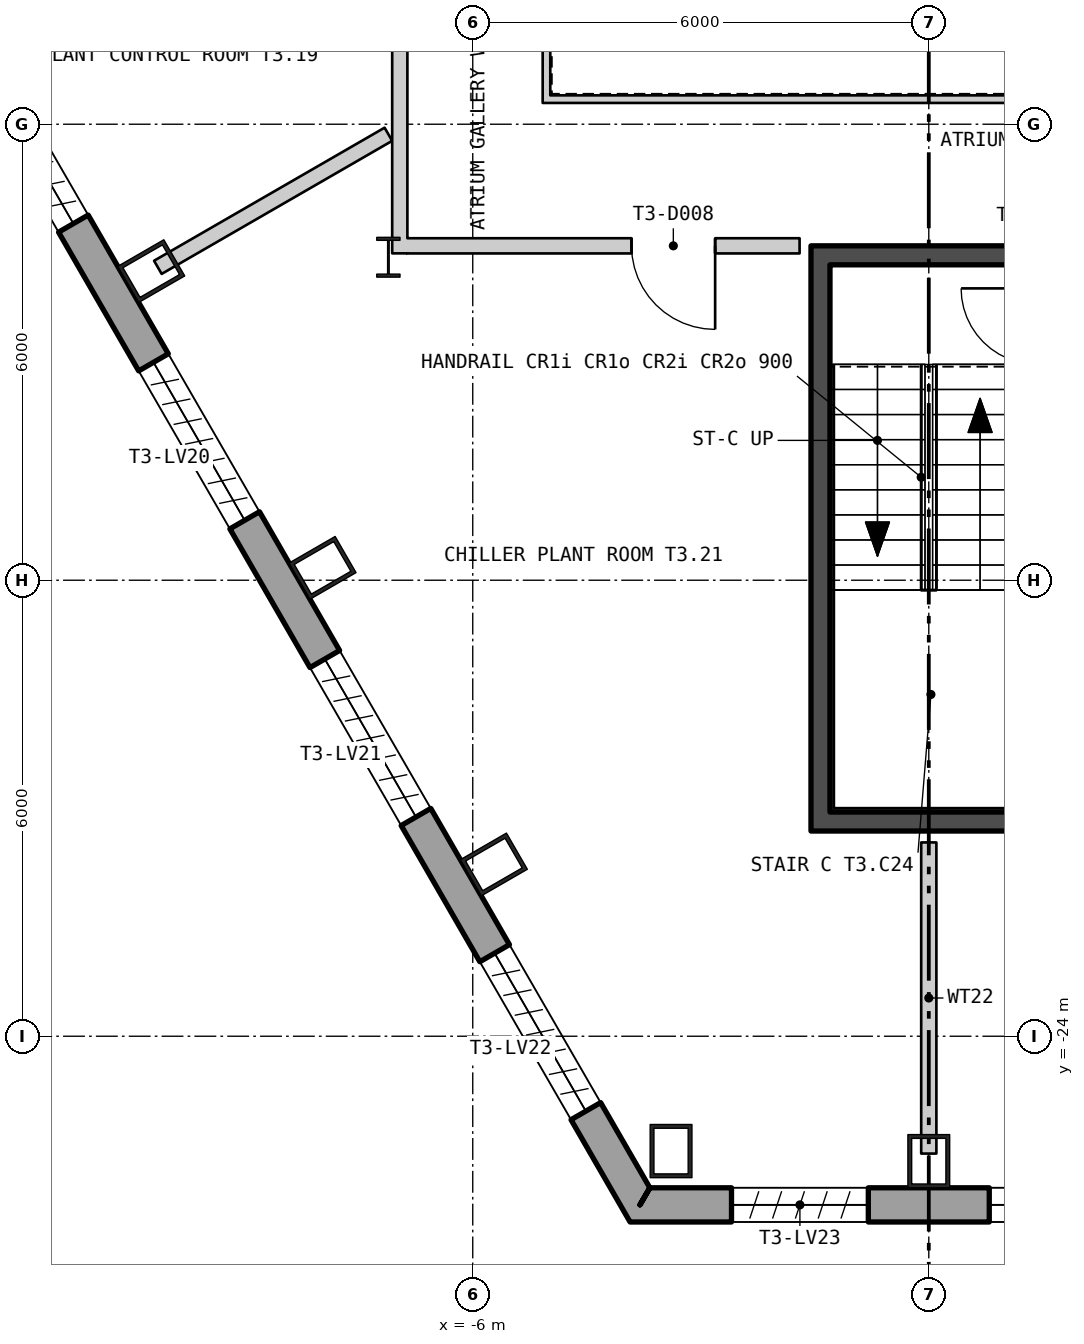
"""IFC4 building model, lengths in metres.
Left out: names, types, materials, properties, quantities, classifications, styles, units other than length and angle.
Written with IfcOpenShell. Run it as: python <this file> out.ifc"""

import sys

from ifc_helpers import new_model, si_unit, direction, frame, frame_2d, origin, origin_2d, place, context, subcontext, project, spatial, polyline, rectangle, hollow_rectangle, i_section, outline, extrude, element, fill, save


model = new_model("IFC4")
c1 = context("Model", 3, precision=1e-05, world=origin(), true_north=direction((0.0, 1.0)))
c2 = subcontext(c1, "Body", "Model", "MODEL_VIEW")
j1 = project(units=[si_unit("LENGTHUNIT", "METRE"), si_unit("PLANEANGLEUNIT", "RADIAN")], contexts=[c1])
p1 = place(None, origin())
s1 = spatial("IfcSite", under=j1, at=p1, CompositionType="ELEMENT")
p2 = place(p1, origin())
s2 = spatial("IfcBuilding", under=s1, at=p2, CompositionType="ELEMENT")
p3 = place(p2, frame((0.0, 0.0, 186.6)))
s3 = spatial("IfcBuildingStorey", under=s2, at=p3, CompositionType="ELEMENT", Elevation=186.6)
for number, where, z_axis, x_axis in (
    (1, (-10.23, -13.933, 0.0), (0.0, 0.0, 1.0), (0.5, -0.866, 0.0)),
    (2, (-7.976, -17.837, 0.0), (0.0, 0.0, 1.0), (0.5, -0.866, 0.0)),
    (3, (-5.722, -21.74, 0.0), (0.0, 0.0, 1.0), (0.5, -0.866, 0.0)),
    (4, (-3.391, -25.511, 0.0), (0.0, 0.0, 1.0), (1.0, 0.0, 0.0)),
    (5, (0.0, -25.644, 0.0), (0.0, 0.0, 1.0), (1.0, 0.0, 0.0)),
):
    element("IfcColumn", number, at=place(p3, frame(where, z_axis=z_axis, x_axis=x_axis)), inside=s3, PredefinedType="COLUMN", context=c2, shape_type="SweptSolid", body=[
        extrude(hollow_rectangle(XDim=0.55, YDim=0.7, WallThickness=0.05, at=origin_2d()), origin(), (0.0, 0.0, 1.0), 6.0),
    ])
p4 = place(p3, frame((-7.11, -13.75, 0.0), z_axis=(0.0, 0.0, 1.0), x_axis=(1.0, 0.0, 0.0)))
e6 = element("IfcColumn", 6, at=p4, inside=s3, PredefinedType="COLUMN", context=c2, shape_type="SweptSolid", body=[
    extrude(i_section(OverallWidth=0.306, OverallDepth=0.524, WebThickness=0.021, FlangeThickness=0.04, at=origin_2d()), origin(), (0.0, 0.0, 1.0), 6.0),
])
p5 = place(p3, frame((-26.67, 13.393, -0.18), z_axis=(0.0, 0.0, 1.0), x_axis=(0.500000711659, -0.866024992908, 0.0)))
e7 = element("IfcWall", 7, at=p5, inside=s3, PredefinedType="SOLIDWALL", context=c2, shape_type="SweptSolid", body=[
    extrude(outline(polyline([(-0.13, -0.225), (45.87, -0.225), (45.61, 0.225), (0.13, 0.225), (-0.13, -0.225)])), origin(), (0.0, 0.0, 1.0), 6.0),
])
p6 = place(p5, frame((1.424, 0.0, 1.38)))
e8 = element("IfcOpeningElement", 8, at=p6, cuts=e7, PredefinedType="OPENING", context=c2, shape_type="SweptSolid", body=[
    extrude(rectangle(XDim=2.4, YDim=3.6, at=frame_2d((1.2, 1.8))), frame((0.0, 0.235, 0.0), z_axis=(0.0, -1.0, 0.0), x_axis=(1.0, 0.0, 0.0)), (0.0, 0.0, 1.0), 0.47),
])
p7 = place(p5, frame((5.893, 0.0, 1.38)))
e9 = element("IfcOpeningElement", 9, at=p7, cuts=e7, PredefinedType="OPENING", context=c2, shape_type="SweptSolid", body=[
    extrude(rectangle(XDim=2.4, YDim=3.6, at=frame_2d((1.2, 1.8))), frame((0.0, 0.235, 0.0), z_axis=(0.0, -1.0, 0.0), x_axis=(1.0, 0.0, 0.0)), (0.0, 0.0, 1.0), 0.47),
])
p8 = place(p5, frame((10.401, 0.0, 1.38)))
e10 = element("IfcOpeningElement", 10, at=p8, cuts=e7, PredefinedType="OPENING", context=c2, shape_type="SweptSolid", body=[
    extrude(rectangle(XDim=2.4, YDim=3.6, at=frame_2d((1.2, 1.8))), frame((0.0, 0.235, 0.0), z_axis=(0.0, -1.0, 0.0), x_axis=(1.0, 0.0, 0.0)), (0.0, 0.0, 1.0), 0.47),
])
p9 = place(p5, frame((14.909, 0.0, 1.38)))
e11 = element("IfcOpeningElement", 11, at=p9, cuts=e7, PredefinedType="OPENING", context=c2, shape_type="SweptSolid", body=[
    extrude(rectangle(XDim=2.4, YDim=3.6, at=frame_2d((1.2, 1.8))), frame((0.0, 0.235, 0.0), z_axis=(0.0, -1.0, 0.0), x_axis=(1.0, 0.0, 0.0)), (0.0, 0.0, 1.0), 0.47),
])
p10 = place(p5, frame((19.416, 0.0, 1.38)))
e12 = element("IfcOpeningElement", 12, at=p10, cuts=e7, PredefinedType="OPENING", context=c2, shape_type="SweptSolid", body=[
    extrude(rectangle(XDim=2.4, YDim=3.6, at=frame_2d((1.2, 1.8))), frame((0.0, 0.235, 0.0), z_axis=(0.0, -1.0, 0.0), x_axis=(1.0, 0.0, 0.0)), (0.0, 0.0, 1.0), 0.47),
])
p11 = place(p5, frame((23.924, 0.0, 1.38)))
e13 = element("IfcOpeningElement", 13, at=p11, cuts=e7, PredefinedType="OPENING", context=c2, shape_type="SweptSolid", body=[
    extrude(rectangle(XDim=2.4, YDim=3.6, at=frame_2d((1.2, 1.8))), frame((0.0, 0.235, 0.0), z_axis=(0.0, -1.0, 0.0), x_axis=(1.0, 0.0, 0.0)), (0.0, 0.0, 1.0), 0.47),
])
p12 = place(p5, frame((28.431, 0.0, 1.38)))
e14 = element("IfcOpeningElement", 14, at=p12, cuts=e7, PredefinedType="OPENING", context=c2, shape_type="SweptSolid", body=[
    extrude(rectangle(XDim=2.4, YDim=3.6, at=frame_2d((1.2, 1.8))), frame((0.0, 0.235, 0.0), z_axis=(0.0, -1.0, 0.0), x_axis=(1.0, 0.0, 0.0)), (0.0, 0.0, 1.0), 0.47),
])
p13 = place(p5, frame((32.939, 0.0, 1.38)))
e15 = element("IfcOpeningElement", 15, at=p13, cuts=e7, PredefinedType="OPENING", context=c2, shape_type="SweptSolid", body=[
    extrude(rectangle(XDim=2.4, YDim=3.6, at=frame_2d((1.2, 1.8))), frame((0.0, 0.235, 0.0), z_axis=(0.0, -1.0, 0.0), x_axis=(1.0, 0.0, 0.0)), (0.0, 0.0, 1.0), 0.47),
])
p14 = place(p5, frame((37.447, 0.0, 1.38)))
e16 = element("IfcOpeningElement", 16, at=p14, cuts=e7, PredefinedType="OPENING", context=c2, shape_type="SweptSolid", body=[
    extrude(rectangle(XDim=2.4, YDim=3.6, at=frame_2d((1.2, 1.8))), frame((0.0, 0.235, 0.0), z_axis=(0.0, -1.0, 0.0), x_axis=(1.0, 0.0, 0.0)), (0.0, 0.0, 1.0), 0.47),
])
p15 = place(p5, frame((41.916, 0.0, 1.38)))
e17 = element("IfcOpeningElement", 17, at=p15, cuts=e7, PredefinedType="OPENING", context=c2, shape_type="SweptSolid", body=[
    extrude(rectangle(XDim=2.4, YDim=3.6, at=frame_2d((1.2, 1.8))), frame((0.0, 0.235, 0.0), z_axis=(0.0, -1.0, 0.0), x_axis=(1.0, 0.0, 0.0)), (0.0, 0.0, 1.0), 0.47),
])
p16 = place(p3, frame((-3.8, -26.219, -0.18), z_axis=(0.0, 0.0, 1.0), x_axis=(1.0, 0.0, 0.0)))
e18 = element("IfcWall", 18, at=p16, inside=s3, PredefinedType="SOLIDWALL", context=c2, shape_type="SweptSolid", body=[
    extrude(outline(polyline([(-0.13, -0.225), (7.73, -0.225), (7.47, 0.225), (0.13, 0.225), (-0.13, -0.225)])), origin(), (0.0, 0.0, 1.0), 6.0),
])
p17 = place(p16, frame((1.204, 0.0, 1.38)))
e19 = element("IfcOpeningElement", 19, at=p17, cuts=e18, PredefinedType="OPENING", context=c2, shape_type="SweptSolid", body=[
    extrude(rectangle(XDim=1.8, YDim=3.6, at=frame_2d((0.9, 1.8))), frame((0.0, 0.235, 0.0), z_axis=(0.0, -1.0, 0.0), x_axis=(1.0, 0.0, 0.0)), (0.0, 0.0, 1.0), 0.47),
])
p18 = place(p16, frame((4.596, 0.0, 1.38)))
e20 = element("IfcOpeningElement", 20, at=p18, cuts=e18, PredefinedType="OPENING", context=c2, shape_type="SweptSolid", body=[
    extrude(rectangle(XDim=1.8, YDim=3.6, at=frame_2d((0.9, 1.8))), frame((0.0, 0.235, 0.0), z_axis=(0.0, -1.0, 0.0), x_axis=(1.0, 0.0, 0.0)), (0.0, 0.0, 1.0), 0.47),
])
p19 = place(p3, frame((-5.08, -11.67, 0.0), z_axis=(0.0, 0.0, 1.0), x_axis=(1.0, 0.0, 0.0)))
e21 = element("IfcWall", 21, at=p19, inside=s3, PredefinedType="PARTITIONING", context=c2, shape_type="SweptSolid", body=[
    extrude(rectangle(XDim=10.16, YDim=0.1, at=frame_2d((5.08, 0.0))), origin(), (0.0, 0.0, 1.0), 5.8),
])
p20 = place(p3, frame((-5.03, -3.58, 0.0), z_axis=(0.0, 0.0, 1.0), x_axis=(0.0, -1.0, 0.0)))
e22 = element("IfcWall", 22, at=p20, inside=s3, PredefinedType="PARTITIONING", context=c2, shape_type="SweptSolid", body=[
    extrude(rectangle(XDim=8.04, YDim=0.1, at=frame_2d((4.02, 0.0))), origin(), (0.0, 0.0, 1.0), 5.8),
])
p21 = place(p3, frame((-1.425, -21.05, 0.0), z_axis=(0.0, 0.0, 1.0), x_axis=(0.0, 1.0, 0.0)))
e23 = element("IfcWall", 23, at=p21, inside=s3, PredefinedType="SHEAR", context=c2, shape_type="SweptSolid", body=[
    extrude(rectangle(XDim=7.2, YDim=0.25, at=frame_2d((3.6, 0.0))), origin(), (0.0, 0.0, 1.0), 5.8),
])
for number, where, z_axis, x_axis in (
    (24, (-1.55, -21.175, 0.0), (0.0, 0.0, 1.0), (1.0, 0.0, 0.0)),
    (25, (-1.55, -13.725, 0.0), (0.0, 0.0, 1.0), (1.0, 0.0, 0.0)),
):
    element("IfcWall", number, at=place(p3, frame(where, z_axis=z_axis, x_axis=x_axis)), inside=s3, PredefinedType="SHEAR", context=c2, shape_type="SweptSolid", body=[
        extrude(rectangle(XDim=3.1, YDim=0.25, at=frame_2d((1.55, 0.0))), origin(), (0.0, 0.0, 1.0), 5.8),
    ])
p22 = place(p3, frame((-10.143, -13.883, 0.0), z_axis=(0.0, 0.0, 1.0), x_axis=(0.866038183914, 0.499977863513, 0.0)))
e26 = element("IfcWall", 26, at=p22, inside=s3, PredefinedType="PARTITIONING", context=c2, shape_type="SweptSolid", body=[
    extrude(rectangle(XDim=3.502, YDim=0.2, at=frame_2d((1.751, 0.0))), origin(), (0.0, 0.0, 1.0), 5.8),
])
p23 = place(p3, frame((-6.96, -13.699, 0.0), z_axis=(0.0, 0.0, 1.0), x_axis=(0.0, 1.0, 0.0)))
e27 = element("IfcWall", 27, at=p23, inside=s3, PredefinedType="PARTITIONING", context=c2, shape_type="SweptSolid", body=[
    extrude(rectangle(XDim=10.499, YDim=0.2, at=frame_2d((5.25, 0.0))), origin(), (0.0, 0.0, 1.0), 5.21),
])
p24 = place(p23, frame((3.656, 0.0, 0.0)))
e28 = element("IfcOpeningElement", 28, at=p24, cuts=e27, PredefinedType="OPENING", context=c2, shape_type="SweptSolid", body=[
    extrude(rectangle(XDim=1.1, YDim=2.1, at=frame_2d((0.55, 1.05))), frame((0.0, 0.11, 0.0), z_axis=(0.0, -1.0, 0.0), x_axis=(1.0, 0.0, 0.0)), (0.0, 0.0, 1.0), 0.22),
])
p25 = place(p23, frame((7.059, 0.0, 0.0)))
e29 = element("IfcOpeningElement", 29, at=p25, cuts=e27, PredefinedType="OPENING", context=c2, shape_type="SweptSolid", body=[
    extrude(rectangle(XDim=1.1, YDim=2.1, at=frame_2d((0.55, 1.05))), frame((0.0, 0.11, 0.0), z_axis=(0.0, -1.0, 0.0), x_axis=(1.0, 0.0, 0.0)), (0.0, 0.0, 1.0), 0.22),
])
p26 = place(p3, frame((-6.86, -13.6, 0.0), z_axis=(0.0, 0.0, 1.0), x_axis=(1.0, 0.0, 0.0)))
e30 = element("IfcWall", 30, at=p26, inside=s3, PredefinedType="PARTITIONING", context=c2, shape_type="SweptSolid", body=[
    extrude(rectangle(XDim=5.16, YDim=0.2, at=frame_2d((2.58, 0.0))), origin(), (0.0, 0.0, 1.0), 5.01),
])
p27 = place(p26, frame((2.949, 0.0, 0.0)))
e31 = element("IfcOpeningElement", 31, at=p27, cuts=e30, PredefinedType="OPENING", context=c2, shape_type="SweptSolid", body=[
    extrude(rectangle(XDim=1.1, YDim=2.1, at=frame_2d((0.55, 1.05))), frame((0.0, 0.11, 0.0), z_axis=(0.0, -1.0, 0.0), x_axis=(1.0, 0.0, 0.0)), (0.0, 0.0, 1.0), 0.22),
])
p28 = place(p3, frame((0.0, -25.544, 0.0), z_axis=(0.0, 0.0, 1.0), x_axis=(0.0, 1.0, 0.0)))
e32 = element("IfcWall", 32, at=p28, inside=s3, PredefinedType="PARTITIONING", context=c2, shape_type="SweptSolid", body=[
    extrude(rectangle(XDim=4.094, YDim=0.2, at=frame_2d((2.047, 0.0))), origin(), (0.0, 0.0, 1.0), 5.25),
])
p29 = place(p27, origin())
e33 = element("IfcDoor", 33, at=p29, inside=s3, OperationType="SINGLE_SWING_RIGHT", PredefinedType="DOOR", context=c2, shape_type="SweptSolid", body=[
    extrude(rectangle(XDim=1.1, YDim=2.1, at=frame_2d((0.55, 1.05))), frame((0.0, 0.025, 0.0), z_axis=(0.0, -1.0, 0.0), x_axis=(1.0, 0.0, 0.0)), (0.0, 0.0, 1.0), 0.05),
])
fill(e31, e33)
save(model, sys.argv[1])
